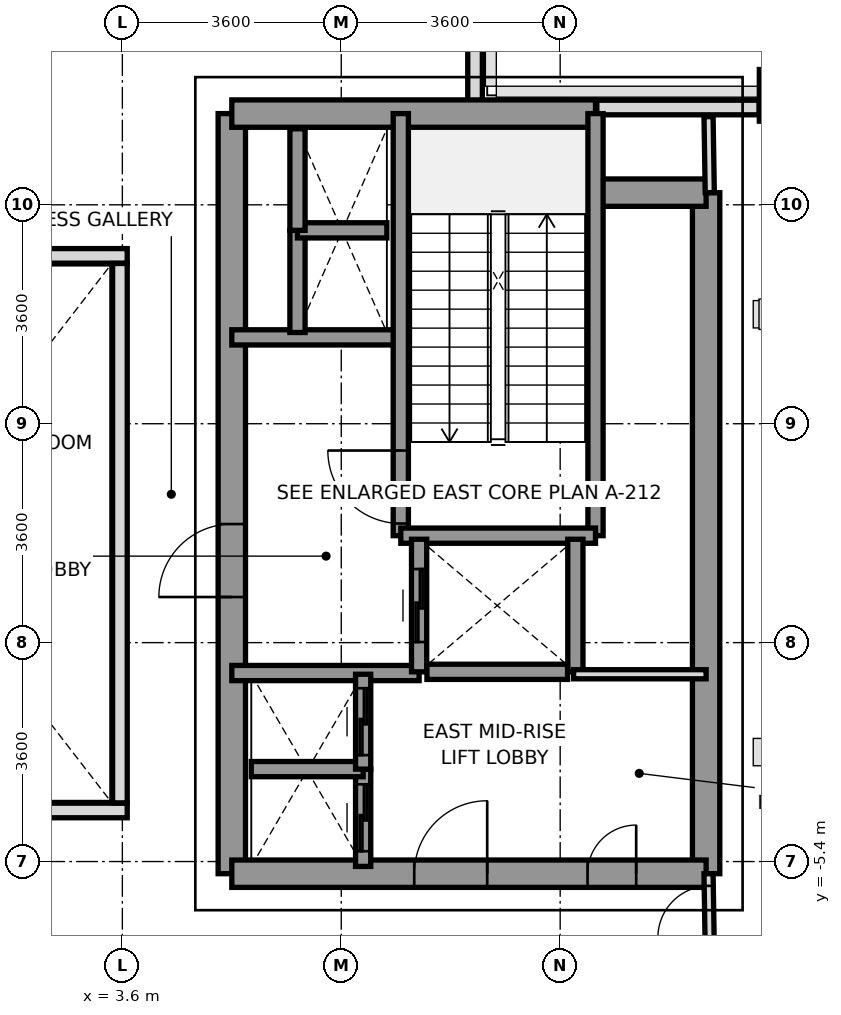
"""IFC4 building model, lengths in metres.
Left out: names, types, materials, properties, quantities, classifications, styles, units other than length and angle.
Written with IfcOpenShell. Run it as: python <this file> out.ifc"""

import sys

from ifc_helpers import new_model, si_unit, direction, frame, frame_2d, origin, origin_2d, place, context, subcontext, project, spatial, rectangle, extrude, source, transform, mapped, element, fill, save


model = new_model("IFC4")
c1 = context("Model", 3, precision=1e-05, world=origin(), true_north=direction((0.0, 1.0)))
c2 = subcontext(c1, "Body", "Model", "MODEL_VIEW")
j1 = project(units=[si_unit("LENGTHUNIT", "METRE"), si_unit("PLANEANGLEUNIT", "RADIAN")], contexts=[c1])
p1 = place(None, origin())
s1 = spatial("IfcSite", under=j1, at=p1, CompositionType="ELEMENT")
p2 = place(p1, origin())
s2 = spatial("IfcBuilding", under=s1, at=p2, CompositionType="ELEMENT")
p3 = place(p2, frame((0.0, 0.0, 151.6)))
s3 = spatial("IfcBuildingStorey", under=s2, at=p3, CompositionType="ELEMENT", Elevation=151.6)
m1 = source(origin(), c2, "Body", "SweptSolid", [
    extrude(rectangle(XDim=0.65, YDim=0.85, at=origin_2d()), origin(), (0.0, 0.0, 1.0), 4.4),
])
p4 = place(p3, frame((14.4, 7.2, 0.0), z_axis=(0.0, 0.0, 1.0), x_axis=(1.0, 0.0, 0.0)))
e1 = element("IfcColumn", 1, at=p4, inside=s3, PredefinedType="COLUMN", context=c2, shape_type="MappedRepresentation", body=[
    mapped(m1, transform((0.0, 0.0, 0.0), x_axis=(1.0, 0.0, 0.0), y_axis=(0.0, 1.0, 0.0), z_axis=(0.0, 0.0, 1.0), scale=1.0)),
])
p5 = place(p3, frame((9.4, 8.472, 0.0), z_axis=(0.0, 0.0, 1.0), x_axis=(0.0, -1.0, 0.0)))
e2 = element("IfcWall", 2, at=p5, inside=s3, PredefinedType="PARAPET", context=c2, shape_type="SweptSolid", body=[
    extrude(rectangle(XDim=1.519, YDim=0.24, at=frame_2d((0.76, 0.0))), origin(), (0.0, 0.0, 1.0), 1.15),
])
p6 = place(p3, frame((11.403, 7.0, 0.0), z_axis=(0.0, 0.0, 1.0), x_axis=(1.0, 0.0, 0.0)))
e3 = element("IfcWall", 3, at=p6, inside=s3, PredefinedType="PARAPET", context=c2, shape_type="SweptSolid", body=[
    extrude(rectangle(XDim=2.669, YDim=0.24, at=frame_2d((1.334, 0.0))), origin(), (0.0, 0.0, 1.0), 1.15),
])
p7 = place(p3, frame((13.2, -5.6, 0.0), z_axis=(0.0, 0.0, 1.0), x_axis=(0.0, 1.0, 0.0)))
e4 = element("IfcWall", 4, at=p7, inside=s3, PredefinedType="SHEAR", context=c2, shape_type="SweptSolid", body=[
    extrude(rectangle(XDim=11.2, YDim=0.45, at=frame_2d((5.6, 0.0))), origin(), (0.0, 0.0, 1.0), 4.4),
])
p8 = place(p3, frame((5.4, -5.6, 0.0), z_axis=(0.0, 0.0, 1.0), x_axis=(0.0, 1.0, 0.0)))
e5 = element("IfcWall", 5, at=p8, inside=s3, PredefinedType="SHEAR", context=c2, shape_type="SweptSolid", body=[
    extrude(rectangle(XDim=12.5, YDim=0.45, at=frame_2d((6.25, 0.0))), origin(), (0.0, 0.0, 1.0), 4.4),
])
p9 = place(p8, frame((4.55, 0.0, 0.0)))
e6 = element("IfcOpeningElement", 6, at=p9, cuts=e5, PredefinedType="OPENING", context=c2, shape_type="SweptSolid", body=[
    extrude(rectangle(XDim=1.2, YDim=2.2, at=frame_2d((0.6, 1.1))), frame((0.0, 0.235, 0.0), z_axis=(0.0, -1.0, 0.0), x_axis=(1.0, 0.0, 0.0)), (0.0, 0.0, 1.0), 0.47),
])
p10 = place(p3, frame((5.4, 6.9, 0.0), z_axis=(0.0, 0.0, 1.0), x_axis=(1.0, 0.0, 0.0)))
e7 = element("IfcWall", 7, at=p10, inside=s3, PredefinedType="SHEAR", context=c2, shape_type="SweptSolid", body=[
    extrude(rectangle(XDim=5.981, YDim=0.45, at=frame_2d((2.991, 0.0))), origin(), (0.0, 0.0, 1.0), 4.4),
])
p11 = place(p3, frame((11.381, 5.6, 0.0), z_axis=(0.0, 0.0, 1.0), x_axis=(1.0, 0.0, 0.0)))
e8 = element("IfcWall", 8, at=p11, inside=s3, PredefinedType="SHEAR", context=c2, shape_type="SweptSolid", body=[
    extrude(rectangle(XDim=1.819, YDim=0.45, at=frame_2d((0.909, 0.0))), origin(), (0.0, 0.0, 1.0), 4.4),
])
p12 = place(p3, frame((5.4, -5.6, 0.0), z_axis=(0.0, 0.0, 1.0), x_axis=(1.0, 0.0, 0.0)))
e9 = element("IfcWall", 9, at=p12, inside=s3, PredefinedType="SHEAR", context=c2, shape_type="SweptSolid", body=[
    extrude(rectangle(XDim=7.8, YDim=0.45, at=frame_2d((3.9, 0.0))), origin(), (0.0, 0.0, 1.0), 4.4),
])
p13 = place(p12, frame((3.0, 0.0, 0.0)))
e10 = element("IfcOpeningElement", 10, at=p13, cuts=e9, PredefinedType="OPENING", context=c2, shape_type="SweptSolid", body=[
    extrude(rectangle(XDim=1.2, YDim=2.2, at=frame_2d((0.6, 1.1))), frame((0.0, 0.235, 0.0), z_axis=(0.0, -1.0, 0.0), x_axis=(1.0, 0.0, 0.0)), (0.0, 0.0, 1.0), 0.47),
])
p14 = place(p12, frame((5.85, 0.0, 0.0)))
e11 = element("IfcOpeningElement", 11, at=p14, cuts=e9, PredefinedType="OPENING", context=c2, shape_type="SweptSolid", body=[
    extrude(rectangle(XDim=0.8, YDim=2.1, at=frame_2d((0.4, 1.05))), frame((0.0, 0.235, 0.0), z_axis=(0.0, -1.0, 0.0), x_axis=(1.0, 0.0, 0.0)), (0.0, 0.0, 1.0), 0.47),
])
p15 = place(p3, frame((5.4, 3.22, 0.0), z_axis=(0.0, 0.0, 1.0), x_axis=(1.0, 0.0, 0.0)))
e12 = element("IfcWall", 12, at=p15, inside=s3, PredefinedType="SOLIDWALL", context=c2, shape_type="SweptSolid", body=[
    extrude(rectangle(XDim=2.78, YDim=0.25, at=frame_2d((1.39, 0.0))), origin(), (0.0, 0.0, 1.0), 4.4),
])
p16 = place(p3, frame((5.4, -2.3, 0.0), z_axis=(0.0, 0.0, 1.0), x_axis=(1.0, 0.0, 0.0)))
e13 = element("IfcWall", 13, at=p16, inside=s3, PredefinedType="SOLIDWALL", context=c2, shape_type="SweptSolid", body=[
    extrude(rectangle(XDim=3.08, YDim=0.25, at=frame_2d((1.54, 0.0))), origin(), (0.0, 0.0, 1.0), 4.4),
])
p17 = place(p3, frame((8.179, -0.041, 0.0), z_axis=(0.0, 0.0, 1.0), x_axis=(0.0, 1.0, 0.0)))
e14 = element("IfcWall", 14, at=p17, inside=s3, PredefinedType="SOLIDWALL", context=c2, shape_type="SweptSolid", body=[
    extrude(rectangle(XDim=6.941, YDim=0.25, at=frame_2d((3.47, 0.0))), origin(), (0.0, 0.0, 1.0), 4.4),
])
p18 = place(p17, frame((0.2, 0.0, 0.0)))
e15 = element("IfcOpeningElement", 15, at=p18, cuts=e14, PredefinedType="OPENING", context=c2, shape_type="SweptSolid", body=[
    extrude(rectangle(XDim=1.2, YDim=2.2, at=frame_2d((0.6, 1.1))), frame((0.0, 0.135, 0.0), z_axis=(0.0, -1.0, 0.0), x_axis=(1.0, 0.0, 0.0)), (0.0, 0.0, 1.0), 0.27),
])
p19 = place(p3, frame((11.381, -0.041, 0.0), z_axis=(0.0, 0.0, 1.0), x_axis=(0.0, 1.0, 0.0)))
e16 = element("IfcWall", 16, at=p19, inside=s3, PredefinedType="SOLIDWALL", context=c2, shape_type="SweptSolid", body=[
    extrude(rectangle(XDim=6.941, YDim=0.25, at=frame_2d((3.47, 0.0))), origin(), (0.0, 0.0, 1.0), 4.4),
])
p20 = place(p3, frame((8.179, -0.041, 0.0), z_axis=(0.0, 0.0, 1.0), x_axis=(1.0, 0.0, 0.0)))
e17 = element("IfcWall", 17, at=p20, inside=s3, PredefinedType="SOLIDWALL", context=c2, shape_type="SweptSolid", body=[
    extrude(rectangle(XDim=3.202, YDim=0.25, at=frame_2d((1.601, 0.0))), origin(), (0.0, 0.0, 1.0), 4.4),
])
p21 = place(p3, frame((8.48, -2.28, 0.0), z_axis=(0.0, 0.0, 1.0), x_axis=(0.0, 1.0, 0.0)))
e18 = element("IfcWall", 18, at=p21, inside=s3, PredefinedType="SOLIDWALL", context=c2, shape_type="SweptSolid", body=[
    extrude(rectangle(XDim=2.18, YDim=0.25, at=frame_2d((1.09, 0.0))), origin(), (0.0, 0.0, 1.0), 4.4),
])
p22 = place(p21, frame((0.49, 0.0, 0.0)))
e19 = element("IfcOpeningElement", 19, at=p22, cuts=e18, PredefinedType="OPENING", context=c2, shape_type="SweptSolid", body=[
    extrude(rectangle(XDim=1.2, YDim=2.2, at=frame_2d((0.6, 1.1))), frame((0.0, 0.135, 0.0), z_axis=(0.0, -1.0, 0.0), x_axis=(1.0, 0.0, 0.0)), (0.0, 0.0, 1.0), 0.27),
])
p23 = place(p3, frame((11.05, -2.28, 0.0), z_axis=(0.0, 0.0, 1.0), x_axis=(0.0, 1.0, 0.0)))
e20 = element("IfcWall", 20, at=p23, inside=s3, PredefinedType="SOLIDWALL", context=c2, shape_type="SweptSolid", body=[
    extrude(rectangle(XDim=2.18, YDim=0.25, at=frame_2d((1.09, 0.0))), origin(), (0.0, 0.0, 1.0), 4.4),
])
p24 = place(p3, frame((8.609, -2.28, 0.0), z_axis=(0.0, 0.0, 1.0), x_axis=(1.0, 0.0, 0.0)))
e21 = element("IfcWall", 21, at=p24, inside=s3, PredefinedType="SOLIDWALL", context=c2, shape_type="SweptSolid", body=[
    extrude(rectangle(XDim=2.312, YDim=0.25, at=frame_2d((1.156, 0.0))), origin(), (0.0, 0.0, 1.0), 4.4),
])
p25 = place(p3, frame((7.56, -5.48, 0.0), z_axis=(0.0, 0.0, 1.0), x_axis=(0.0, 1.0, 0.0)))
e22 = element("IfcWall", 22, at=p25, inside=s3, PredefinedType="SOLIDWALL", context=c2, shape_type="SweptSolid", body=[
    extrude(rectangle(XDim=1.6, YDim=0.25, at=frame_2d((0.8, 0.0))), origin(), (0.0, 0.0, 1.0), 4.4),
])
p26 = place(p25, frame((0.25, 0.0, 0.0)))
e23 = element("IfcOpeningElement", 23, at=p26, cuts=e22, PredefinedType="OPENING", context=c2, shape_type="SweptSolid", body=[
    extrude(rectangle(XDim=1.1, YDim=2.2, at=frame_2d((0.55, 1.1))), frame((0.0, 0.135, 0.0), z_axis=(0.0, -1.0, 0.0), x_axis=(1.0, 0.0, 0.0)), (0.0, 0.0, 1.0), 0.27),
])
p27 = place(p3, frame((5.72, -3.88, 0.0), z_axis=(0.0, 0.0, 1.0), x_axis=(1.0, 0.0, 0.0)))
e24 = element("IfcWall", 24, at=p27, inside=s3, PredefinedType="SOLIDWALL", context=c2, shape_type="SweptSolid", body=[
    extrude(rectangle(XDim=1.84, YDim=0.25, at=frame_2d((0.92, 0.0))), origin(), (0.0, 0.0, 1.0), 4.4),
])
p28 = place(p3, frame((7.56, -3.88, 0.0), z_axis=(0.0, 0.0, 1.0), x_axis=(0.0, 1.0, 0.0)))
e25 = element("IfcWall", 25, at=p28, inside=s3, PredefinedType="SOLIDWALL", context=c2, shape_type="SweptSolid", body=[
    extrude(rectangle(XDim=1.56, YDim=0.25, at=frame_2d((0.78, 0.0))), origin(), (0.0, 0.0, 1.0), 4.4),
])
p29 = place(p28, frame((0.23, 0.0, 0.0)))
e26 = element("IfcOpeningElement", 26, at=p29, cuts=e25, PredefinedType="OPENING", context=c2, shape_type="SweptSolid", body=[
    extrude(rectangle(XDim=1.1, YDim=2.2, at=frame_2d((0.55, 1.1))), frame((0.0, 0.135, 0.0), z_axis=(0.0, -1.0, 0.0), x_axis=(1.0, 0.0, 0.0)), (0.0, 0.0, 1.0), 0.27),
])
p30 = place(p3, frame((6.48, 3.3, 0.0), z_axis=(0.0, 0.0, 1.0), x_axis=(0.0, 1.0, 0.0)))
e27 = element("IfcWall", 27, at=p30, inside=s3, PredefinedType="SOLIDWALL", context=c2, shape_type="SweptSolid", body=[
    extrude(rectangle(XDim=1.68, YDim=0.25, at=frame_2d((0.84, 0.0))), origin(), (0.0, 0.0, 1.0), 4.4),
])
p31 = place(p3, frame((6.48, 4.98, 0.0), z_axis=(0.0, 0.0, 1.0), x_axis=(1.0, 0.0, 0.0)))
e28 = element("IfcWall", 28, at=p31, inside=s3, PredefinedType="SOLIDWALL", context=c2, shape_type="SweptSolid", body=[
    extrude(rectangle(XDim=1.47, YDim=0.25, at=frame_2d((0.735, 0.0))), origin(), (0.0, 0.0, 1.0), 4.4),
])
p32 = place(p3, frame((6.48, 4.98, 0.0), z_axis=(0.0, 0.0, 1.0), x_axis=(0.0, 1.0, 0.0)))
e29 = element("IfcWall", 29, at=p32, inside=s3, PredefinedType="SOLIDWALL", context=c2, shape_type="SweptSolid", body=[
    extrude(rectangle(XDim=1.67, YDim=0.25, at=frame_2d((0.835, 0.0))), origin(), (0.0, 0.0, 1.0), 4.4),
])
p33 = place(p3, frame((11.02, -2.32, 0.0), z_axis=(0.0, 0.0, 1.0), x_axis=(1.0, 0.0, 0.0)))
e30 = element("IfcWall", 30, at=p33, inside=s3, PredefinedType="PARTITIONING", context=c2, shape_type="SweptSolid", body=[
    extrude(rectangle(XDim=2.18, YDim=0.15, at=frame_2d((1.09, 0.0))), origin(), (0.0, 0.0, 1.0), 4.4),
])
p34 = place(p3, frame((13.26, -6.85, 0.0), z_axis=(0.0, 0.0, 1.0), x_axis=(-0.016013571389, 0.999871774545, 0.0)))
e31 = element("IfcWall", 31, at=p34, inside=s3, PredefinedType="PARTITIONING", context=c2, shape_type="SweptSolid", body=[
    extrude(rectangle(XDim=1.25, YDim=0.15, at=frame_2d((0.625, 0.0))), origin(), (0.0, 0.0, 1.0), 4.4),
])
p35 = place(p34, frame((0.2, 0.0, 0.0)))
e32 = element("IfcOpeningElement", 32, at=p35, cuts=e31, PredefinedType="OPENING", context=c2, shape_type="SweptSolid", body=[
    extrude(rectangle(XDim=0.85, YDim=2.1, at=frame_2d((0.425, 1.05))), frame((0.0, 0.085, 0.0), z_axis=(0.0, -1.0, 0.0), x_axis=(1.0, 0.0, 0.0)), (0.0, 0.0, 1.0), 0.17),
])
p36 = place(p3, frame((13.26, 5.6, 0.0), z_axis=(0.0, 0.0, 1.0), x_axis=(-0.016013571389, 0.999871774545, 0.0)))
e33 = element("IfcWall", 33, at=p36, inside=s3, PredefinedType="PARTITIONING", context=c2, shape_type="SweptSolid", body=[
    extrude(rectangle(XDim=1.25, YDim=0.15, at=frame_2d((0.625, 0.0))), origin(), (0.0, 0.0, 1.0), 4.4),
])
for number, where, z_axis, x_axis in (
    (34, (-3.68, -4.56, 0.0), (0.0, 0.0, 1.0), (1.0, 0.0, 0.0)),
    (35, (-3.68, 4.56, 0.0), (0.0, 0.0, 1.0), (1.0, 0.0, 0.0)),
):
    element("IfcWall", number, at=place(p3, frame(where, z_axis=z_axis, x_axis=x_axis)), inside=s3, PredefinedType="PARAPET", context=c2, shape_type="SweptSolid", body=[
        extrude(rectangle(XDim=7.36, YDim=0.24, at=frame_2d((3.68, 0.0))), origin(), (0.0, 0.0, 1.0), 1.15),
    ])
p37 = place(p3, frame((3.56, -4.435, 0.0), z_axis=(0.0, 0.0, 1.0), x_axis=(0.0, 1.0, 0.0)))
e36 = element("IfcWall", 36, at=p37, inside=s3, PredefinedType="PARAPET", context=c2, shape_type="SweptSolid", body=[
    extrude(rectangle(XDim=8.87, YDim=0.24, at=frame_2d((4.435, 0.0))), origin(), (0.0, 0.0, 1.0), 1.15),
])
m2 = source(origin(), c2, "Body", "SweptSolid", [
    extrude(rectangle(XDim=1.2, YDim=2.2, at=frame_2d((0.6, 1.1))), frame((0.0, 0.025, 0.0), z_axis=(0.0, -1.0, 0.0), x_axis=(1.0, 0.0, 0.0)), (0.0, 0.0, 1.0), 0.05),
])
p38 = place(p18, origin())
e37 = element("IfcDoor", 37, at=p38, inside=s3, OperationType="SINGLE_SWING_RIGHT", PredefinedType="DOOR", context=c2, shape_type="MappedRepresentation", body=[
    mapped(m2, transform((0.0, 0.0, 0.0), x_axis=(1.0, 0.0, 0.0), y_axis=(0.0, 1.0, 0.0), z_axis=(0.0, 0.0, 1.0), scale=1.0)),
])
fill(e15, e37)
p39 = place(p9, origin())
e38 = element("IfcDoor", 38, at=p39, inside=s3, OperationType="SINGLE_SWING_LEFT", PredefinedType="DOOR", context=c2, shape_type="MappedRepresentation", body=[
    mapped(m2, transform((0.0, 0.0, 0.0), x_axis=(1.0, 0.0, 0.0), y_axis=(0.0, 1.0, 0.0), z_axis=(0.0, 0.0, 1.0), scale=1.0)),
])
fill(e6, e38)
p40 = place(p13, origin())
e39 = element("IfcDoor", 39, at=p40, inside=s3, OperationType="SINGLE_SWING_RIGHT", PredefinedType="DOOR", context=c2, shape_type="MappedRepresentation", body=[
    mapped(m2, transform((0.0, 0.0, 0.0), x_axis=(1.0, 0.0, 0.0), y_axis=(0.0, 1.0, 0.0), z_axis=(0.0, 0.0, 1.0), scale=1.0)),
])
fill(e10, e39)
m3 = source(origin(), c2, "Body", "SweptSolid", [
    extrude(rectangle(XDim=0.8, YDim=2.1, at=frame_2d((0.4, 1.05))), frame((0.0, 0.025, 0.0), z_axis=(0.0, -1.0, 0.0), x_axis=(1.0, 0.0, 0.0)), (0.0, 0.0, 1.0), 0.05),
])
p41 = place(p14, origin())
e40 = element("IfcDoor", 40, at=p41, inside=s3, OperationType="SINGLE_SWING_RIGHT", PredefinedType="DOOR", context=c2, shape_type="MappedRepresentation", body=[
    mapped(m3, transform((0.0, 0.0, 0.0), x_axis=(1.0, 0.0, 0.0), y_axis=(0.0, 1.0, 0.0), z_axis=(0.0, 0.0, 1.0), scale=1.0)),
])
fill(e11, e40)
p42 = place(p22, origin())
e41 = element("IfcDoor", 41, at=p42, inside=s3, OperationType="SLIDING_TO_RIGHT", PredefinedType="DOOR", context=c2, shape_type="MappedRepresentation", body=[
    mapped(m2, transform((0.0, 0.0, 0.0), x_axis=(1.0, 0.0, 0.0), y_axis=(0.0, 1.0, 0.0), z_axis=(0.0, 0.0, 1.0), scale=1.0)),
])
fill(e19, e41)
m4 = source(origin(), c2, "Body", "SweptSolid", [
    extrude(rectangle(XDim=1.1, YDim=2.2, at=frame_2d((0.55, 1.1))), frame((0.0, 0.025, 0.0), z_axis=(0.0, -1.0, 0.0), x_axis=(1.0, 0.0, 0.0)), (0.0, 0.0, 1.0), 0.05),
])
p43 = place(p26, origin())
e42 = element("IfcDoor", 42, at=p43, inside=s3, OperationType="SLIDING_TO_LEFT", PredefinedType="DOOR", context=c2, shape_type="MappedRepresentation", body=[
    mapped(m4, transform((0.0, 0.0, 0.0), x_axis=(1.0, 0.0, 0.0), y_axis=(0.0, 1.0, 0.0), z_axis=(0.0, 0.0, 1.0), scale=1.0)),
])
fill(e23, e42)
p44 = place(p29, origin())
e43 = element("IfcDoor", 43, at=p44, inside=s3, OperationType="SLIDING_TO_LEFT", PredefinedType="DOOR", context=c2, shape_type="MappedRepresentation", body=[
    mapped(m4, transform((0.0, 0.0, 0.0), x_axis=(1.0, 0.0, 0.0), y_axis=(0.0, 1.0, 0.0), z_axis=(0.0, 0.0, 1.0), scale=1.0)),
])
fill(e26, e43)
m5 = source(origin(), c2, "Body", "SweptSolid", [
    extrude(rectangle(XDim=0.85, YDim=2.1, at=frame_2d((0.425, 1.05))), frame((0.0, 0.025, 0.0), z_axis=(0.0, -1.0, 0.0), x_axis=(1.0, 0.0, 0.0)), (0.0, 0.0, 1.0), 0.05),
])
p45 = place(p35, origin())
e44 = element("IfcDoor", 44, at=p45, inside=s3, OperationType="SINGLE_SWING_LEFT", PredefinedType="DOOR", context=c2, shape_type="MappedRepresentation", body=[
    mapped(m5, transform((0.0, 0.0, 0.0), x_axis=(1.0, 0.0, 0.0), y_axis=(0.0, 1.0, 0.0), z_axis=(0.0, 0.0, 1.0), scale=1.0)),
])
fill(e32, e44)
save(model, sys.argv[1])
